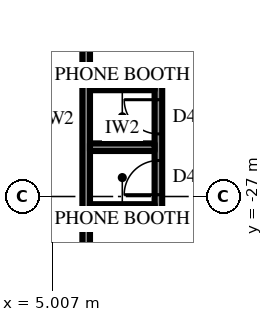
"""IFC4 building model, lengths in metres.
Left out: names, types, materials, properties, quantities, classifications, styles, units other than length and angle.
Written with IfcOpenShell. Run it as: python <this file> out.ifc"""

import sys

from ifc_helpers import new_model, si_unit, direction, frame, frame_2d, origin, place, context, subcontext, project, spatial, rectangle, extrude, element, fill, save


model = new_model("IFC4")
c1 = context("Model", 3, precision=1e-05, world=origin(), true_north=direction((0.0, 1.0)))
c2 = subcontext(c1, "Body", "Model", "MODEL_VIEW")
j1 = project(units=[si_unit("LENGTHUNIT", "METRE"), si_unit("PLANEANGLEUNIT", "RADIAN")], contexts=[c1])
p1 = place(None, origin())
s1 = spatial("IfcSite", under=j1, at=p1, CompositionType="ELEMENT")
p2 = place(p1, origin())
s2 = spatial("IfcBuilding", under=s1, at=p2, CompositionType="ELEMENT")
p3 = place(p2, frame((0.0, 0.0, 52.9)))
s3 = spatial("IfcBuildingStorey", under=s2, at=p3, CompositionType="ELEMENT", Elevation=52.9)
p4 = place(p3, frame((5.9, -17.7, 0.0), z_axis=(0.0, 0.0, 1.0), x_axis=(0.0, -1.0, 0.0)))
e1 = element("IfcWall", 1, at=p4, inside=s3, PredefinedType="PARTITIONING", context=c2, shape_type="SweptSolid", body=[
    extrude(rectangle(XDim=14.55, YDim=0.2, at=frame_2d((7.275, 0.0))), origin(), (0.0, 0.0, 1.0), 4.0),
])
p5 = place(p4, frame((0.955, 0.0, 0.0)))
e2 = element("IfcOpeningElement", 2, at=p5, cuts=e1, PredefinedType="OPENING", context=c2, shape_type="SweptSolid", body=[
    extrude(rectangle(XDim=1.0, YDim=2.2, at=frame_2d((0.5, 1.1))), frame((0.0, 0.11, 0.0), z_axis=(0.0, -1.0, 0.0), x_axis=(1.0, 0.0, 0.0)), (0.0, 0.0, 1.0), 0.22),
])
p6 = place(p3, frame((7.8, -24.002, 0.0), z_axis=(0.0, 0.0, 1.0), x_axis=(0.0, -1.0, 0.0)))
e3 = element("IfcWall", 3, at=p6, inside=s3, PredefinedType="PARTITIONING", context=c2, shape_type="SweptSolid", body=[
    extrude(rectangle(XDim=3.4, YDim=0.2, at=frame_2d((1.7, 0.0))), origin(), (0.0, 0.0, 1.0), 4.0),
])
p7 = place(p6, frame((0.45, 0.0, 0.0)))
e4 = element("IfcOpeningElement", 4, at=p7, cuts=e3, PredefinedType="OPENING", context=c2, shape_type="SweptSolid", body=[
    extrude(rectangle(XDim=0.9, YDim=2.2, at=frame_2d((0.45, 1.1))), frame((0.0, 0.11, 0.0), z_axis=(0.0, -1.0, 0.0), x_axis=(1.0, 0.0, 0.0)), (0.0, 0.0, 1.0), 0.22),
])
p8 = place(p6, frame((2.05, 0.0, 0.0)))
e5 = element("IfcOpeningElement", 5, at=p8, cuts=e3, PredefinedType="OPENING", context=c2, shape_type="SweptSolid", body=[
    extrude(rectangle(XDim=0.9, YDim=2.2, at=frame_2d((0.45, 1.1))), frame((0.0, 0.11, 0.0), z_axis=(0.0, -1.0, 0.0), x_axis=(1.0, 0.0, 0.0)), (0.0, 0.0, 1.0), 0.22),
])
for number, where, z_axis, x_axis in (
    (6, (6.0, -24.103, 0.0), (0.0, 0.0, 1.0), (1.0, 0.0, 0.0)),
    (7, (6.0, -25.702, 0.0), (0.0, 0.0, 1.0), (1.0, 0.0, 0.0)),
    (8, (6.0, -27.302, 0.0), (0.0, 0.0, 1.0), (1.0, 0.0, 0.0)),
):
    element("IfcWall", number, at=place(p3, frame(where, z_axis=z_axis, x_axis=x_axis)), inside=s3, PredefinedType="PARTITIONING", context=c2, shape_type="SweptSolid", body=[
        extrude(rectangle(XDim=1.7, YDim=0.2, at=frame_2d((0.85, 0.0))), origin(), (0.0, 0.0, 1.0), 4.0),
    ])
p9 = place(p7, frame((0.9, 0.0, 0.0), z_axis=(0.0, 0.0, 1.0), x_axis=(-1.0, 0.0, 0.0)))
e9 = element("IfcDoor", 9, at=p9, inside=s3, OperationType="SINGLE_SWING_LEFT", PredefinedType="DOOR", context=c2, shape_type="SweptSolid", body=[
    extrude(rectangle(XDim=0.9, YDim=2.2, at=frame_2d((0.45, 1.1))), frame((0.0, 0.025, 0.0), z_axis=(0.0, -1.0, 0.0), x_axis=(1.0, 0.0, 0.0)), (0.0, 0.0, 1.0), 0.05),
])
fill(e4, e9)
p10 = place(p8, frame((0.9, 0.0, 0.0), z_axis=(0.0, 0.0, 1.0), x_axis=(-1.0, 0.0, 0.0)))
e10 = element("IfcDoor", 10, at=p10, inside=s3, OperationType="SINGLE_SWING_RIGHT", PredefinedType="DOOR", context=c2, shape_type="SweptSolid", body=[
    extrude(rectangle(XDim=0.9, YDim=2.2, at=frame_2d((0.45, 1.1))), frame((0.0, 0.025, 0.0), z_axis=(0.0, -1.0, 0.0), x_axis=(1.0, 0.0, 0.0)), (0.0, 0.0, 1.0), 0.05),
])
fill(e5, e10)
save(model, sys.argv[1])
